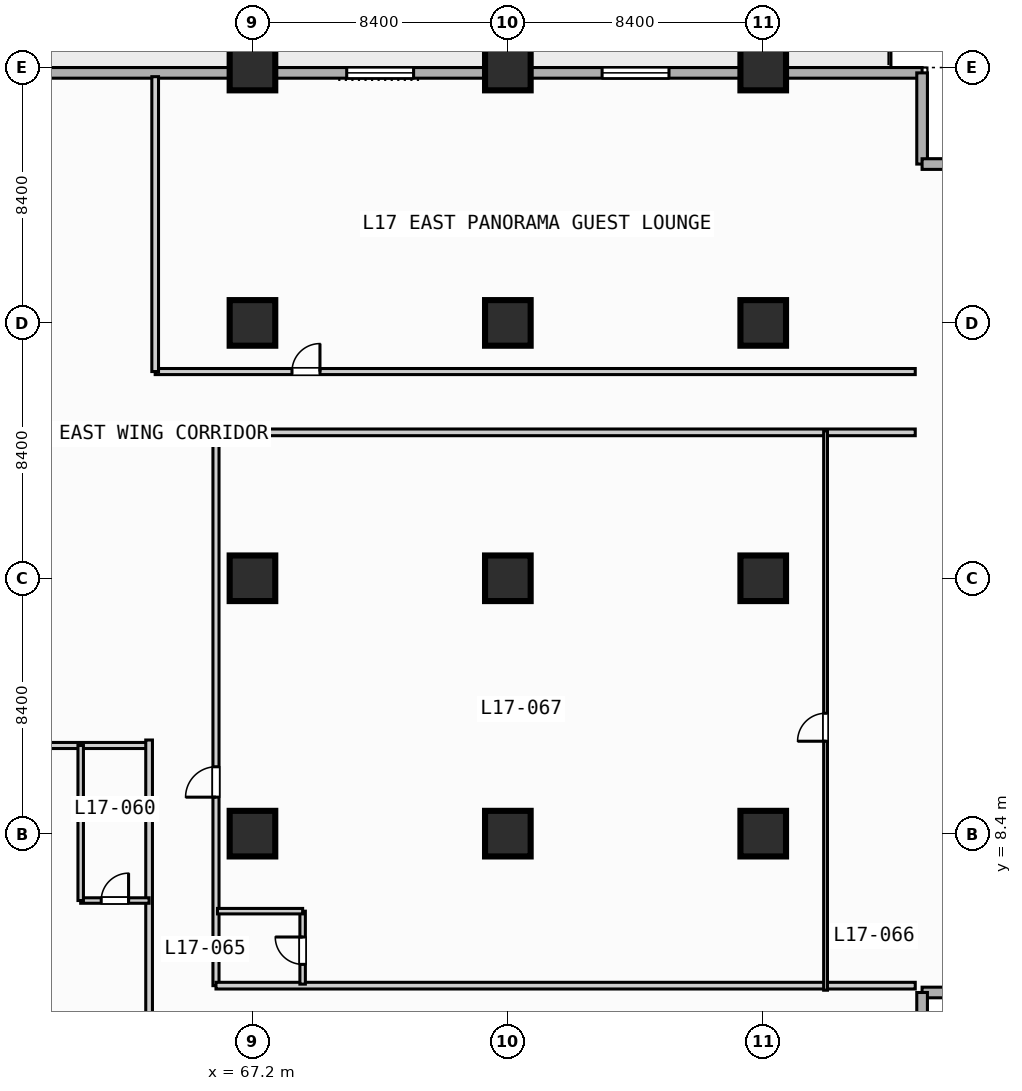
"""IFC4 building model, lengths in metres.
Left out: names, types, materials, properties, quantities, classifications, styles, units other than length and angle.
Written with IfcOpenShell. Run it as: python <this file> out.ifc"""

import sys

from ifc_helpers import new_model, si_unit, direction, frame, frame_2d, origin, origin_2d, place, context, subcontext, project, spatial, rectangle, extrude, element, fill, save


model = new_model("IFC4")
c1 = context("Model", 3, precision=1e-05, world=origin(), true_north=direction((0.0, 1.0)))
c2 = subcontext(c1, "Body", "Model", "MODEL_VIEW")
j1 = project(units=[si_unit("LENGTHUNIT", "METRE"), si_unit("PLANEANGLEUNIT", "RADIAN")], contexts=[c1])
p1 = place(None, origin())
s1 = spatial("IfcSite", under=j1, at=p1, CompositionType="ELEMENT")
p2 = place(p1, origin())
s2 = spatial("IfcBuilding", under=s1, at=p2, CompositionType="ELEMENT")
p3 = place(p2, frame((0.0, 0.0, 73.8)))
s3 = spatial("IfcBuildingStorey", under=s2, at=p3, CompositionType="ELEMENT", Elevation=73.8)
for number, where, z_axis, x_axis in (
    (1, (67.2, 8.4, 0.0), (0.0, 0.0, 1.0), (1.0, 0.0, 0.0)),
    (2, (67.2, 16.8, 0.0), (0.0, 0.0, 1.0), (1.0, 0.0, 0.0)),
    (3, (67.2, 25.2, 0.0), (0.0, 0.0, 1.0), (1.0, 0.0, 0.0)),
    (4, (67.2, 33.6, 0.0), (0.0, 0.0, 1.0), (1.0, 0.0, 0.0)),
    (5, (75.6, 8.4, 0.0), (0.0, 0.0, 1.0), (1.0, 0.0, 0.0)),
    (6, (75.6, 16.8, 0.0), (0.0, 0.0, 1.0), (1.0, 0.0, 0.0)),
    (7, (75.6, 25.2, 0.0), (0.0, 0.0, 1.0), (1.0, 0.0, 0.0)),
    (8, (75.6, 33.6, 0.0), (0.0, 0.0, 1.0), (1.0, 0.0, 0.0)),
    (9, (84.0, 8.4, 0.0), (0.0, 0.0, 1.0), (1.0, 0.0, 0.0)),
    (10, (84.0, 16.8, 0.0), (0.0, 0.0, 1.0), (1.0, 0.0, 0.0)),
    (11, (84.0, 25.2, 0.0), (0.0, 0.0, 1.0), (1.0, 0.0, 0.0)),
    (12, (84.0, 33.6, 0.0), (0.0, 0.0, 1.0), (1.0, 0.0, 0.0)),
):
    element("IfcColumn", number, at=place(p3, frame(where, z_axis=z_axis, x_axis=x_axis)), inside=s3, PredefinedType="COLUMN", context=c2, shape_type="SweptSolid", body=[
        extrude(rectangle(XDim=1.5, YDim=1.5, at=origin_2d()), origin(), (0.0, 0.0, 1.0), 3.8),
    ])
p4 = place(p3, frame((33.425, 33.425, 0.0), z_axis=(0.0, 0.0, 1.0), x_axis=(1.0, 0.0, 0.0)))
e13 = element("IfcWall", 13, at=p4, inside=s3, PredefinedType="STANDARD", context=c2, shape_type="SweptSolid", body=[
    extrude(rectangle(XDim=55.8, YDim=0.35, at=frame_2d((27.9, 0.0))), origin(), (0.0, 0.0, 1.0), 3.55),
])
p5 = place(p4, frame((12.075, 0.0, 0.0)))
e14 = element("IfcOpeningElement", 14, at=p5, cuts=e13, PredefinedType="OPENING", context=c2, shape_type="SweptSolid", body=[
    extrude(rectangle(XDim=1.4, YDim=2.2, at=frame_2d((0.7, 1.1))), frame((0.0, 0.185, 0.0), z_axis=(0.0, -1.0, 0.0), x_axis=(1.0, 0.0, 0.0)), (0.0, 0.0, 1.0), 0.37),
])
p6 = place(p4, frame((3.275, 0.0, 0.85)))
e15 = element("IfcOpeningElement", 15, at=p6, cuts=e13, PredefinedType="OPENING", context=c2, shape_type="SweptSolid", body=[
    extrude(rectangle(XDim=2.2, YDim=1.8, at=frame_2d((1.1, 0.9))), frame((0.0, 0.185, 0.0), z_axis=(0.0, -1.0, 0.0), x_axis=(1.0, 0.0, 0.0)), (0.0, 0.0, 1.0), 0.37),
])
p7 = place(p4, frame((36.875, 0.0, 0.85)))
e16 = element("IfcOpeningElement", 16, at=p7, cuts=e13, PredefinedType="OPENING", context=c2, shape_type="SweptSolid", body=[
    extrude(rectangle(XDim=2.2, YDim=1.8, at=frame_2d((1.1, 0.9))), frame((0.0, 0.185, 0.0), z_axis=(0.0, -1.0, 0.0), x_axis=(1.0, 0.0, 0.0)), (0.0, 0.0, 1.0), 0.37),
])
p8 = place(p4, frame((45.275, 0.0, 0.85)))
e17 = element("IfcOpeningElement", 17, at=p8, cuts=e13, PredefinedType="OPENING", context=c2, shape_type="SweptSolid", body=[
    extrude(rectangle(XDim=2.2, YDim=1.8, at=frame_2d((1.1, 0.9))), frame((0.0, 0.185, 0.0), z_axis=(0.0, -1.0, 0.0), x_axis=(1.0, 0.0, 0.0)), (0.0, 0.0, 1.0), 0.37),
])
for number, where, z_axis, x_axis in (
    (18, (89.225, 33.425, 0.0), (0.0, 0.0, 1.0), (0.0, -1.0, 0.0)),
    (19, (89.225, 30.425, 0.0), (0.0, 0.0, 1.0), (1.0, 0.0, 0.0)),
    (20, (92.225, 3.175, 0.0), (0.0, 0.0, 1.0), (-1.0, 0.0, 0.0)),
    (21, (89.225, 3.175, 0.0), (0.0, 0.0, 1.0), (0.0, -1.0, 0.0)),
):
    element("IfcWall", number, at=place(p3, frame(where, z_axis=z_axis, x_axis=x_axis)), inside=s3, PredefinedType="STANDARD", context=c2, shape_type="SweptSolid", body=[
        extrude(rectangle(XDim=3.0, YDim=0.35, at=frame_2d((1.5, 0.0))), origin(), (0.0, 0.0, 1.0), 3.55),
    ])
p9 = place(p3, frame((13.7, 11.3, 0.0), z_axis=(0.0, 0.0, 1.0), x_axis=(1.0, 0.0, 0.0)))
e22 = element("IfcWall", 22, at=p9, inside=s3, PredefinedType="PARTITIONING", context=c2, shape_type="SweptSolid", body=[
    extrude(rectangle(XDim=50.1, YDim=0.2, at=frame_2d((25.05, 0.0))), origin(), (0.0, 0.0, 1.0), 3.55),
])
p10 = place(p9, frame((3.61, 0.0, 0.0)))
e23 = element("IfcOpeningElement", 23, at=p10, cuts=e22, PredefinedType="OPENING", context=c2, shape_type="SweptSolid", body=[
    extrude(rectangle(XDim=1.0, YDim=2.15, at=frame_2d((0.5, 1.075))), frame((0.0, 0.11, 0.0), z_axis=(0.0, -1.0, 0.0), x_axis=(1.0, 0.0, 0.0)), (0.0, 0.0, 1.0), 0.22),
])
p11 = place(p9, frame((16.81, 0.0, 0.0)))
e24 = element("IfcOpeningElement", 24, at=p11, cuts=e22, PredefinedType="OPENING", context=c2, shape_type="SweptSolid", body=[
    extrude(rectangle(XDim=1.0, YDim=2.15, at=frame_2d((0.5, 1.075))), frame((0.0, 0.11, 0.0), z_axis=(0.0, -1.0, 0.0), x_axis=(1.0, 0.0, 0.0)), (0.0, 0.0, 1.0), 0.22),
])
p12 = place(p9, frame((31.935, 0.0, 0.0)))
e25 = element("IfcOpeningElement", 25, at=p12, cuts=e22, PredefinedType="OPENING", context=c2, shape_type="SweptSolid", body=[
    extrude(rectangle(XDim=1.0, YDim=2.15, at=frame_2d((0.5, 1.075))), frame((0.0, 0.11, 0.0), z_axis=(0.0, -1.0, 0.0), x_axis=(1.0, 0.0, 0.0)), (0.0, 0.0, 1.0), 0.22),
])
p13 = place(p9, frame((43.785, 0.0, 0.0)))
e26 = element("IfcOpeningElement", 26, at=p13, cuts=e22, PredefinedType="OPENING", context=c2, shape_type="SweptSolid", body=[
    extrude(rectangle(XDim=1.0, YDim=2.15, at=frame_2d((0.5, 1.075))), frame((0.0, 0.11, 0.0), z_axis=(0.0, -1.0, 0.0), x_axis=(1.0, 0.0, 0.0)), (0.0, 0.0, 1.0), 0.22),
])
p14 = place(p3, frame((63.8, 0.2, 0.0), z_axis=(0.0, 0.0, 1.0), x_axis=(0.0, 1.0, 0.0)))
e27 = element("IfcWall", 27, at=p14, inside=s3, PredefinedType="PARTITIONING", context=c2, shape_type="SweptSolid", body=[
    extrude(rectangle(XDim=11.28, YDim=0.22, at=frame_2d((5.64, 0.0))), origin(), (0.0, 0.0, 1.0), 3.55),
])
p15 = place(p3, frame((61.55, 6.2, 0.0), z_axis=(0.0, 0.0, 1.0), x_axis=(1.0, 0.0, 0.0)))
e28 = element("IfcWall", 28, at=p15, inside=s3, PredefinedType="PLUMBINGWALL", context=c2, shape_type="SweptSolid", body=[
    extrude(rectangle(XDim=2.25, YDim=0.18, at=frame_2d((1.125, 0.0))), origin(), (0.0, 0.0, 1.0), 3.55),
])
p16 = place(p15, frame((0.675, 0.0, 0.0)))
e29 = element("IfcOpeningElement", 29, at=p16, cuts=e28, PredefinedType="OPENING", context=c2, shape_type="SweptSolid", body=[
    extrude(rectangle(XDim=0.9, YDim=2.1, at=frame_2d((0.45, 1.05))), frame((0.0, 0.1, 0.0), z_axis=(0.0, -1.0, 0.0), x_axis=(1.0, 0.0, 0.0)), (0.0, 0.0, 1.0), 0.2),
])
p17 = place(p3, frame((61.55, 6.2, 0.0), z_axis=(0.0, 0.0, 1.0), x_axis=(0.0, 1.0, 0.0)))
e30 = element("IfcWall", 30, at=p17, inside=s3, PredefinedType="PLUMBINGWALL", context=c2, shape_type="SweptSolid", body=[
    extrude(rectangle(XDim=5.1, YDim=0.18, at=frame_2d((2.55, 0.0))), origin(), (0.0, 0.0, 1.0), 3.55),
])
p18 = place(p3, frame((66.0, 3.4, 0.0), z_axis=(0.0, 0.0, 1.0), x_axis=(0.0, 1.0, 0.0)))
e31 = element("IfcWall", 31, at=p18, inside=s3, PredefinedType="PARTITIONING", context=c2, shape_type="SweptSolid", body=[
    extrude(rectangle(XDim=18.2, YDim=0.2, at=frame_2d((9.1, 0.0))), origin(), (0.0, 0.0, 1.0), 3.55),
])
p19 = place(p18, frame((6.2, 0.0, 0.0)))
e32 = element("IfcOpeningElement", 32, at=p19, cuts=e31, PredefinedType="OPENING", context=c2, shape_type="SweptSolid", body=[
    extrude(rectangle(XDim=1.0, YDim=2.15, at=frame_2d((0.5, 1.075))), frame((0.0, 0.11, 0.0), z_axis=(0.0, -1.0, 0.0), x_axis=(1.0, 0.0, 0.0)), (0.0, 0.0, 1.0), 0.22),
])
for number, where, z_axis, x_axis in (
    (33, (66.0, 3.4, 0.0), (0.0, 0.0, 1.0), (1.0, 0.0, 0.0)),
    (34, (66.0, 21.6, 0.0), (0.0, 0.0, 1.0), (1.0, 0.0, 0.0)),
):
    element("IfcWall", number, at=place(p3, frame(where, z_axis=z_axis, x_axis=x_axis)), inside=s3, PredefinedType="PARTITIONING", context=c2, shape_type="SweptSolid", body=[
        extrude(rectangle(XDim=23.0, YDim=0.22, at=frame_2d((11.5, 0.0))), origin(), (0.0, 0.0, 1.0), 3.55),
    ])
p20 = place(p3, frame((68.85, 3.45, 0.0), z_axis=(0.0, 0.0, 1.0), x_axis=(0.0, 1.0, 0.0)))
e35 = element("IfcWall", 35, at=p20, inside=s3, PredefinedType="PLUMBINGWALL", context=c2, shape_type="SweptSolid", body=[
    extrude(rectangle(XDim=2.4, YDim=0.18, at=frame_2d((1.2, 0.0))), origin(), (0.0, 0.0, 1.0), 3.55),
])
p21 = place(p20, frame((0.65, 0.0, 0.0)))
e36 = element("IfcOpeningElement", 36, at=p21, cuts=e35, PredefinedType="OPENING", context=c2, shape_type="SweptSolid", body=[
    extrude(rectangle(XDim=0.9, YDim=2.1, at=frame_2d((0.45, 1.05))), frame((0.0, 0.1, 0.0), z_axis=(0.0, -1.0, 0.0), x_axis=(1.0, 0.0, 0.0)), (0.0, 0.0, 1.0), 0.2),
])
p22 = place(p3, frame((66.05, 5.85, 0.0), z_axis=(0.0, 0.0, 1.0), x_axis=(1.0, 0.0, 0.0)))
e37 = element("IfcWall", 37, at=p22, inside=s3, PredefinedType="PLUMBINGWALL", context=c2, shape_type="SweptSolid", body=[
    extrude(rectangle(XDim=2.8, YDim=0.18, at=frame_2d((1.4, 0.0))), origin(), (0.0, 0.0, 1.0), 3.55),
])
p23 = place(p3, frame((86.05, 3.25, 0.0), z_axis=(0.0, 0.0, 1.0), x_axis=(0.0, 1.0, 0.0)))
e38 = element("IfcWall", 38, at=p23, inside=s3, PredefinedType="PARTITIONING", context=c2, shape_type="SweptSolid", body=[
    extrude(rectangle(XDim=18.4, YDim=0.125, at=frame_2d((9.2, 0.0))), origin(), (0.0, 0.0, 1.0), 3.55),
])
p24 = place(p23, frame((8.19, 0.0, 0.0)))
e39 = element("IfcOpeningElement", 39, at=p24, cuts=e38, PredefinedType="OPENING", context=c2, shape_type="SweptSolid", body=[
    extrude(rectangle(XDim=0.92, YDim=2.1, at=frame_2d((0.46, 1.05))), frame((0.0, 0.073, 0.0), z_axis=(0.0, -1.0, 0.0), x_axis=(1.0, 0.0, 0.0)), (0.0, 0.0, 1.0), 0.145),
])
p25 = place(p3, frame((64.0, 23.6, 0.0), z_axis=(0.0, 0.0, 1.0), x_axis=(1.0, 0.0, 0.0)))
e40 = element("IfcWall", 40, at=p25, inside=s3, PredefinedType="PARTITIONING", context=c2, shape_type="SweptSolid", body=[
    extrude(rectangle(XDim=25.0, YDim=0.2, at=frame_2d((12.5, 0.0))), origin(), (0.0, 0.0, 1.0), 3.55),
])
p26 = place(p25, frame((4.5, 0.0, 0.0)))
e41 = element("IfcOpeningElement", 41, at=p26, cuts=e40, PredefinedType="OPENING", context=c2, shape_type="SweptSolid", body=[
    extrude(rectangle(XDim=0.92, YDim=2.1, at=frame_2d((0.46, 1.05))), frame((0.0, 0.11, 0.0), z_axis=(0.0, -1.0, 0.0), x_axis=(1.0, 0.0, 0.0)), (0.0, 0.0, 1.0), 0.22),
])
p27 = place(p3, frame((64.0, 23.6, 0.0), z_axis=(0.0, 0.0, 1.0), x_axis=(0.0, 1.0, 0.0)))
e42 = element("IfcWall", 42, at=p27, inside=s3, PredefinedType="PARTITIONING", context=c2, shape_type="SweptSolid", body=[
    extrude(rectangle(XDim=9.7, YDim=0.22, at=frame_2d((4.85, 0.0))), origin(), (0.0, 0.0, 1.0), 3.55),
])
p28 = place(p7, origin())
e43 = element("IfcWindow", 43, at=p28, inside=s3, PartitioningType="SINGLE_PANEL", PredefinedType="WINDOW", context=c2, shape_type="SweptSolid", body=[
    extrude(rectangle(XDim=2.2, YDim=1.8, at=frame_2d((1.1, 0.9))), frame((0.0, 0.03, 0.0), z_axis=(0.0, -1.0, 0.0), x_axis=(1.0, 0.0, 0.0)), (0.0, 0.0, 1.0), 0.06),
])
fill(e16, e43)
p29 = place(p8, origin())
e44 = element("IfcWindow", 44, at=p29, inside=s3, PartitioningType="SINGLE_PANEL", PredefinedType="WINDOW", context=c2, shape_type="SweptSolid", body=[
    extrude(rectangle(XDim=2.2, YDim=1.8, at=frame_2d((1.1, 0.9))), frame((0.0, 0.03, 0.0), z_axis=(0.0, -1.0, 0.0), x_axis=(1.0, 0.0, 0.0)), (0.0, 0.0, 1.0), 0.06),
])
fill(e17, e44)
p30 = place(p16, origin())
e45 = element("IfcDoor", 45, at=p30, inside=s3, OperationType="SINGLE_SWING_RIGHT", PredefinedType="DOOR", context=c2, shape_type="SweptSolid", body=[
    extrude(rectangle(XDim=0.9, YDim=2.1, at=frame_2d((0.45, 1.05))), frame((0.0, 0.025, 0.0), z_axis=(0.0, -1.0, 0.0), x_axis=(1.0, 0.0, 0.0)), (0.0, 0.0, 1.0), 0.05),
])
fill(e29, e45)
p31 = place(p19, origin())
e46 = element("IfcDoor", 46, at=p31, inside=s3, OperationType="SINGLE_SWING_LEFT", PredefinedType="DOOR", context=c2, shape_type="SweptSolid", body=[
    extrude(rectangle(XDim=1.0, YDim=2.15, at=frame_2d((0.5, 1.075))), frame((0.0, 0.025, 0.0), z_axis=(0.0, -1.0, 0.0), x_axis=(1.0, 0.0, 0.0)), (0.0, 0.0, 1.0), 0.05),
])
fill(e32, e46)
p32 = place(p21, origin())
e47 = element("IfcDoor", 47, at=p32, inside=s3, OperationType="SINGLE_SWING_RIGHT", PredefinedType="DOOR", context=c2, shape_type="SweptSolid", body=[
    extrude(rectangle(XDim=0.9, YDim=2.1, at=frame_2d((0.45, 1.05))), frame((0.0, 0.025, 0.0), z_axis=(0.0, -1.0, 0.0), x_axis=(1.0, 0.0, 0.0)), (0.0, 0.0, 1.0), 0.05),
])
fill(e36, e47)
p33 = place(p24, origin())
e48 = element("IfcDoor", 48, at=p33, inside=s3, OperationType="SINGLE_SWING_LEFT", PredefinedType="DOOR", context=c2, shape_type="SweptSolid", body=[
    extrude(rectangle(XDim=0.92, YDim=2.1, at=frame_2d((0.46, 1.05))), frame((0.0, 0.025, 0.0), z_axis=(0.0, -1.0, 0.0), x_axis=(1.0, 0.0, 0.0)), (0.0, 0.0, 1.0), 0.05),
])
fill(e39, e48)
p34 = place(p26, origin())
e49 = element("IfcDoor", 49, at=p34, inside=s3, OperationType="SINGLE_SWING_RIGHT", PredefinedType="DOOR", context=c2, shape_type="SweptSolid", body=[
    extrude(rectangle(XDim=0.92, YDim=2.1, at=frame_2d((0.46, 1.05))), frame((0.0, 0.025, 0.0), z_axis=(0.0, -1.0, 0.0), x_axis=(1.0, 0.0, 0.0)), (0.0, 0.0, 1.0), 0.05),
])
fill(e41, e49)
save(model, sys.argv[1])
